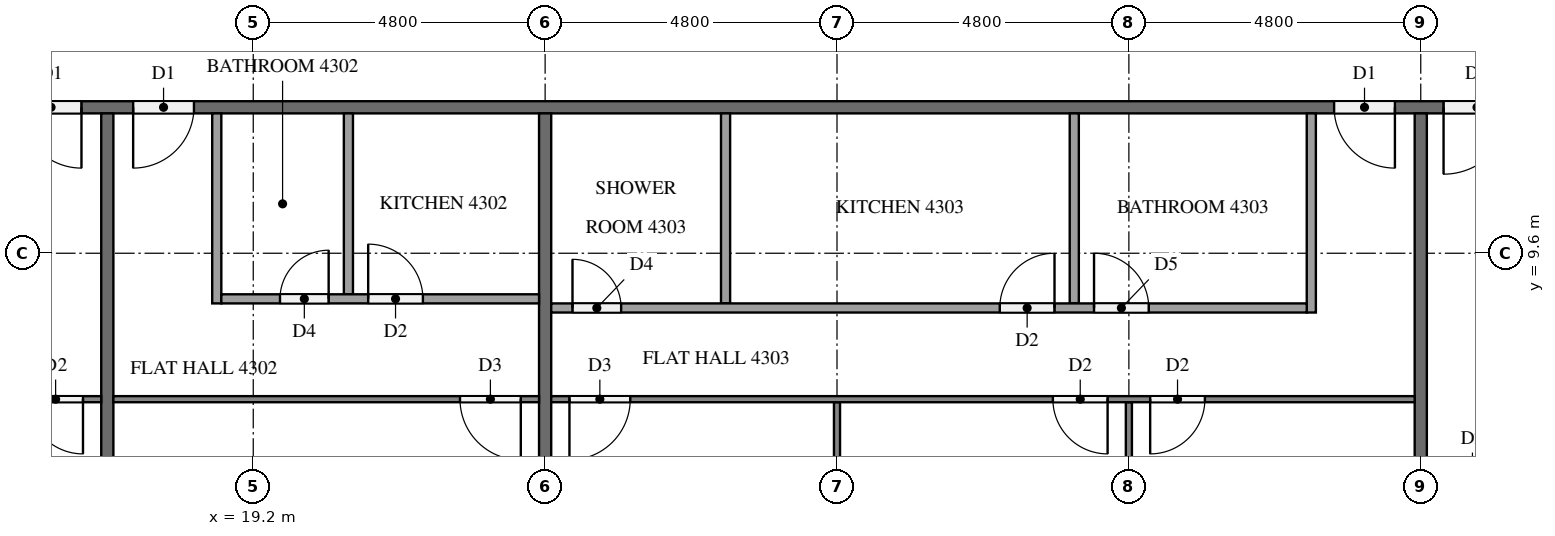
"""IFC4 building model, lengths in metres.
Left out: names, types, materials, properties, quantities, classifications, styles, units other than length and angle.
Written with IfcOpenShell. Run it as: python <this file> out.ifc"""

import sys

from ifc_helpers import new_model, si_unit, direction, frame, frame_2d, origin, place, context, subcontext, project, spatial, rectangle, extrude, element, fill, save


model = new_model("IFC4")
c1 = context("Model", 3, precision=1e-05, world=origin(), true_north=direction((0.0, 1.0)))
c2 = subcontext(c1, "Body", "Model", "MODEL_VIEW")
j1 = project(units=[si_unit("LENGTHUNIT", "METRE"), si_unit("PLANEANGLEUNIT", "RADIAN")], contexts=[c1])
p1 = place(None, origin())
s1 = spatial("IfcSite", under=j1, at=p1, CompositionType="ELEMENT")
p2 = place(p1, origin())
s2 = spatial("IfcBuilding", under=s1, at=p2, CompositionType="ELEMENT")
p3 = place(p2, frame((0.0, 0.0, 166.5)))
s3 = spatial("IfcBuildingStorey", under=s2, at=p3, CompositionType="ELEMENT", Elevation=166.5)
p4 = place(p3, frame((50.5, 12.0, 0.0), z_axis=(0.0, 0.0, 1.0), x_axis=(-1.0, 0.0, 0.0)))
e1 = element("IfcWall", 1, at=p4, inside=s3, PredefinedType="PARTITIONING", context=c2, shape_type="SweptSolid", body=[
    extrude(rectangle(XDim=38.6, YDim=0.2, at=frame_2d((19.3, 0.0))), origin(), (0.0, 0.0, 1.0), 3.2),
])
p5 = place(p4, frame((34.125, 0.0, 0.0)))
e2 = element("IfcOpeningElement", 2, at=p5, cuts=e1, PredefinedType="OPENING", context=c2, shape_type="SweptSolid", body=[
    extrude(rectangle(XDim=1.0, YDim=2.1, at=frame_2d((0.5, 1.05))), frame((0.0, 0.11, 0.0), z_axis=(0.0, -1.0, 0.0), x_axis=(1.0, 0.0, 0.0)), (0.0, 0.0, 1.0), 0.22),
])
p6 = place(p4, frame((32.275, 0.0, 0.0)))
e3 = element("IfcOpeningElement", 3, at=p6, cuts=e1, PredefinedType="OPENING", context=c2, shape_type="SweptSolid", body=[
    extrude(rectangle(XDim=1.0, YDim=2.1, at=frame_2d((0.5, 1.05))), frame((0.0, 0.11, 0.0), z_axis=(0.0, -1.0, 0.0), x_axis=(1.0, 0.0, 0.0)), (0.0, 0.0, 1.0), 0.22),
])
p7 = place(p4, frame((12.525, 0.0, 0.0)))
e4 = element("IfcOpeningElement", 4, at=p7, cuts=e1, PredefinedType="OPENING", context=c2, shape_type="SweptSolid", body=[
    extrude(rectangle(XDim=1.0, YDim=2.1, at=frame_2d((0.5, 1.05))), frame((0.0, 0.11, 0.0), z_axis=(0.0, -1.0, 0.0), x_axis=(1.0, 0.0, 0.0)), (0.0, 0.0, 1.0), 0.22),
])
p8 = place(p4, frame((10.625, 0.0, 0.0)))
e5 = element("IfcOpeningElement", 5, at=p8, cuts=e1, PredefinedType="OPENING", context=c2, shape_type="SweptSolid", body=[
    extrude(rectangle(XDim=1.1, YDim=2.1, at=frame_2d((0.55, 1.05))), frame((0.0, 0.11, 0.0), z_axis=(0.0, -1.0, 0.0), x_axis=(1.0, 0.0, 0.0)), (0.0, 0.0, 1.0), 0.22),
])
p9 = place(p3, frame((16.8, 11.9, 0.0), z_axis=(0.0, 0.0, 1.0), x_axis=(0.0, -1.0, 0.0)))
e6 = element("IfcWall", 6, at=p9, inside=s3, PredefinedType="PARTITIONING", context=c2, shape_type="SweptSolid", body=[
    extrude(rectangle(XDim=11.8, YDim=0.2, at=frame_2d((5.9, 0.0))), origin(), (0.0, 0.0, 1.0), 3.2),
])
p10 = place(p3, frame((24.0, 11.9, 0.0), z_axis=(0.0, 0.0, 1.0), x_axis=(0.0, -1.0, 0.0)))
e7 = element("IfcWall", 7, at=p10, inside=s3, PredefinedType="PARTITIONING", context=c2, shape_type="SweptSolid", body=[
    extrude(rectangle(XDim=11.525, YDim=0.2, at=frame_2d((5.762, 0.0))), origin(), (0.0, 0.0, 1.0), 3.2),
])
p11 = place(p3, frame((38.4, 11.9, 0.0), z_axis=(0.0, 0.0, 1.0), x_axis=(0.0, -1.0, 0.0)))
e8 = element("IfcWall", 8, at=p11, inside=s3, PredefinedType="PARTITIONING", context=c2, shape_type="SweptSolid", body=[
    extrude(rectangle(XDim=11.8, YDim=0.2, at=frame_2d((5.9, 0.0))), origin(), (0.0, 0.0, 1.0), 3.2),
])
p12 = place(p3, frame((16.7, 7.2, 0.0), z_axis=(0.0, 0.0, 1.0), x_axis=(-1.0, 0.0, 0.0)))
e9 = element("IfcWall", 9, at=p12, inside=s3, PredefinedType="PARTITIONING", context=c2, shape_type="SweptSolid", body=[
    extrude(rectangle(XDim=16.6, YDim=0.1, at=frame_2d((8.3, 0.0))), origin(), (0.0, 0.0, 1.0), 3.2),
])
p13 = place(p12, frame((0.3, 0.0, 0.0)))
e10 = element("IfcOpeningElement", 10, at=p13, cuts=e9, PredefinedType="OPENING", context=c2, shape_type="SweptSolid", body=[
    extrude(rectangle(XDim=0.9, YDim=2.1, at=frame_2d((0.45, 1.05))), frame((0.0, 0.06, 0.0), z_axis=(0.0, -1.0, 0.0), x_axis=(1.0, 0.0, 0.0)), (0.0, 0.0, 1.0), 0.12),
])
p14 = place(p12, frame((10.55, 0.0, 0.0)))
e11 = element("IfcOpeningElement", 11, at=p14, cuts=e9, PredefinedType="OPENING", context=c2, shape_type="SweptSolid", body=[
    extrude(rectangle(XDim=1.0, YDim=2.1, at=frame_2d((0.5, 1.05))), frame((0.0, 0.06, 0.0), z_axis=(0.0, -1.0, 0.0), x_axis=(1.0, 0.0, 0.0)), (0.0, 0.0, 1.0), 0.12),
])
p15 = place(p12, frame((12.25, 0.0, 0.0)))
e12 = element("IfcOpeningElement", 12, at=p15, cuts=e9, PredefinedType="OPENING", context=c2, shape_type="SweptSolid", body=[
    extrude(rectangle(XDim=0.9, YDim=2.1, at=frame_2d((0.45, 1.05))), frame((0.0, 0.06, 0.0), z_axis=(0.0, -1.0, 0.0), x_axis=(1.0, 0.0, 0.0)), (0.0, 0.0, 1.0), 0.12),
])
p16 = place(p3, frame((23.9, 7.2, 0.0), z_axis=(0.0, 0.0, 1.0), x_axis=(-1.0, 0.0, 0.0)))
e13 = element("IfcWall", 13, at=p16, inside=s3, PredefinedType="PARTITIONING", context=c2, shape_type="SweptSolid", body=[
    extrude(rectangle(XDim=7.0, YDim=0.1, at=frame_2d((3.5, 0.0))), origin(), (0.0, 0.0, 1.0), 3.2),
])
p17 = place(p16, frame((0.3, 0.0, 0.0)))
e14 = element("IfcOpeningElement", 14, at=p17, cuts=e13, PredefinedType="OPENING", context=c2, shape_type="SweptSolid", body=[
    extrude(rectangle(XDim=1.0, YDim=2.1, at=frame_2d((0.5, 1.05))), frame((0.0, 0.06, 0.0), z_axis=(0.0, -1.0, 0.0), x_axis=(1.0, 0.0, 0.0)), (0.0, 0.0, 1.0), 0.12),
])
p18 = place(p3, frame((20.765, 11.9, 0.0), z_axis=(0.0, 0.0, 1.0), x_axis=(0.0, -1.0, 0.0)))
e15 = element("IfcWall", 15, at=p18, inside=s3, PredefinedType="PARTITIONING", context=c2, shape_type="SweptSolid", body=[
    extrude(rectangle(XDim=2.975, YDim=0.15, at=frame_2d((1.487, 0.0))), origin(), (0.0, 0.0, 1.0), 3.2),
])
p19 = place(p3, frame((18.6, 11.9, 0.0), z_axis=(0.0, 0.0, 1.0), x_axis=(0.0, -1.0, 0.0)))
e16 = element("IfcWall", 16, at=p19, inside=s3, PredefinedType="PARTITIONING", context=c2, shape_type="SweptSolid", body=[
    extrude(rectangle(XDim=3.125, YDim=0.15, at=frame_2d((1.562, 0.0))), origin(), (0.0, 0.0, 1.0), 3.2),
])
p20 = place(p3, frame((18.675, 8.85, 0.0), z_axis=(0.0, 0.0, 1.0), x_axis=(1.0, 0.0, 0.0)))
e17 = element("IfcWall", 17, at=p20, inside=s3, PredefinedType="PARTITIONING", context=c2, shape_type="SweptSolid", body=[
    extrude(rectangle(XDim=5.225, YDim=0.15, at=frame_2d((2.612, 0.0))), origin(), (0.0, 0.0, 1.0), 3.2),
])
p21 = place(p20, frame((0.965, 0.0, 0.0)))
e18 = element("IfcOpeningElement", 18, at=p21, cuts=e17, PredefinedType="OPENING", context=c2, shape_type="SweptSolid", body=[
    extrude(rectangle(XDim=0.8, YDim=2.1, at=frame_2d((0.4, 1.05))), frame((0.0, 0.085, 0.0), z_axis=(0.0, -1.0, 0.0), x_axis=(1.0, 0.0, 0.0)), (0.0, 0.0, 1.0), 0.17),
])
p22 = place(p20, frame((2.415, 0.0, 0.0)))
e19 = element("IfcOpeningElement", 19, at=p22, cuts=e17, PredefinedType="OPENING", context=c2, shape_type="SweptSolid", body=[
    extrude(rectangle(XDim=0.9, YDim=2.1, at=frame_2d((0.45, 1.05))), frame((0.0, 0.085, 0.0), z_axis=(0.0, -1.0, 0.0), x_axis=(1.0, 0.0, 0.0)), (0.0, 0.0, 1.0), 0.17),
])
p23 = place(p3, frame((33.6, 7.15, 0.0), z_axis=(0.0, 0.0, 1.0), x_axis=(0.0, -1.0, 0.0)))
e20 = element("IfcWall", 20, at=p23, inside=s3, PredefinedType="PARTITIONING", context=c2, shape_type="SweptSolid", body=[
    extrude(rectangle(XDim=6.775, YDim=0.1, at=frame_2d((3.387, 0.0))), origin(), (0.0, 0.0, 1.0), 3.2),
])
p24 = place(p3, frame((28.8, 7.15, 0.0), z_axis=(0.0, 0.0, 1.0), x_axis=(0.0, -1.0, 0.0)))
e21 = element("IfcWall", 21, at=p24, inside=s3, PredefinedType="PARTITIONING", context=c2, shape_type="SweptSolid", body=[
    extrude(rectangle(XDim=7.05, YDim=0.1, at=frame_2d((3.525, 0.0))), origin(), (0.0, 0.0, 1.0), 3.2),
])
p25 = place(p3, frame((38.3, 7.2, 0.0), z_axis=(0.0, 0.0, 1.0), x_axis=(-1.0, 0.0, 0.0)))
e22 = element("IfcWall", 22, at=p25, inside=s3, PredefinedType="PARTITIONING", context=c2, shape_type="SweptSolid", body=[
    extrude(rectangle(XDim=14.2, YDim=0.1, at=frame_2d((7.1, 0.0))), origin(), (0.0, 0.0, 1.0), 3.2),
])
p26 = place(p25, frame((3.45, 0.0, 0.0)))
e23 = element("IfcOpeningElement", 23, at=p26, cuts=e22, PredefinedType="OPENING", context=c2, shape_type="SweptSolid", body=[
    extrude(rectangle(XDim=0.9, YDim=2.1, at=frame_2d((0.45, 1.05))), frame((0.0, 0.06, 0.0), z_axis=(0.0, -1.0, 0.0), x_axis=(1.0, 0.0, 0.0)), (0.0, 0.0, 1.0), 0.12),
])
p27 = place(p25, frame((5.05, 0.0, 0.0)))
e24 = element("IfcOpeningElement", 24, at=p27, cuts=e22, PredefinedType="OPENING", context=c2, shape_type="SweptSolid", body=[
    extrude(rectangle(XDim=0.9, YDim=2.1, at=frame_2d((0.45, 1.05))), frame((0.0, 0.06, 0.0), z_axis=(0.0, -1.0, 0.0), x_axis=(1.0, 0.0, 0.0)), (0.0, 0.0, 1.0), 0.12),
])
p28 = place(p25, frame((12.9, 0.0, 0.0)))
e25 = element("IfcOpeningElement", 25, at=p28, cuts=e22, PredefinedType="OPENING", context=c2, shape_type="SweptSolid", body=[
    extrude(rectangle(XDim=1.0, YDim=2.1, at=frame_2d((0.5, 1.05))), frame((0.0, 0.06, 0.0), z_axis=(0.0, -1.0, 0.0), x_axis=(1.0, 0.0, 0.0)), (0.0, 0.0, 1.0), 0.12),
])
for number, where, z_axis, x_axis in (
    (26, (32.702, 11.9, 0.0), (0.0, 0.0, 1.0), (0.0, -1.0, 0.0)),
    (27, (26.967, 11.9, 0.0), (0.0, 0.0, 1.0), (0.0, -1.0, 0.0)),
):
    element("IfcWall", number, at=place(p3, frame(where, z_axis=z_axis, x_axis=x_axis)), inside=s3, PredefinedType="PARTITIONING", context=c2, shape_type="SweptSolid", body=[
        extrude(rectangle(XDim=3.125, YDim=0.15, at=frame_2d((1.562, 0.0))), origin(), (0.0, 0.0, 1.0), 3.2),
    ])
p29 = place(p3, frame((36.6, 11.9, 0.0), z_axis=(0.0, 0.0, 1.0), x_axis=(0.0, -1.0, 0.0)))
e28 = element("IfcWall", 28, at=p29, inside=s3, PredefinedType="PARTITIONING", context=c2, shape_type="SweptSolid", body=[
    extrude(rectangle(XDim=3.275, YDim=0.15, at=frame_2d((1.637, 0.0))), origin(), (0.0, 0.0, 1.0), 3.2),
])
p30 = place(p3, frame((24.1, 8.7, 0.0), z_axis=(0.0, 0.0, 1.0), x_axis=(1.0, 0.0, 0.0)))
e29 = element("IfcWall", 29, at=p30, inside=s3, PredefinedType="PARTITIONING", context=c2, shape_type="SweptSolid", body=[
    extrude(rectangle(XDim=12.425, YDim=0.15, at=frame_2d((6.212, 0.0))), origin(), (0.0, 0.0, 1.0), 3.2),
])
p31 = place(p30, frame((8.927, 0.0, 0.0)))
e30 = element("IfcOpeningElement", 30, at=p31, cuts=e29, PredefinedType="OPENING", context=c2, shape_type="SweptSolid", body=[
    extrude(rectangle(XDim=0.9, YDim=2.1, at=frame_2d((0.45, 1.05))), frame((0.0, 0.085, 0.0), z_axis=(0.0, -1.0, 0.0), x_axis=(1.0, 0.0, 0.0)), (0.0, 0.0, 1.0), 0.17),
])
p32 = place(p30, frame((7.377, 0.0, 0.0)))
e31 = element("IfcOpeningElement", 31, at=p32, cuts=e29, PredefinedType="OPENING", context=c2, shape_type="SweptSolid", body=[
    extrude(rectangle(XDim=0.9, YDim=2.1, at=frame_2d((0.45, 1.05))), frame((0.0, 0.085, 0.0), z_axis=(0.0, -1.0, 0.0), x_axis=(1.0, 0.0, 0.0)), (0.0, 0.0, 1.0), 0.17),
])
p33 = place(p30, frame((0.35, 0.0, 0.0)))
e32 = element("IfcOpeningElement", 32, at=p33, cuts=e29, PredefinedType="OPENING", context=c2, shape_type="SweptSolid", body=[
    extrude(rectangle(XDim=0.8, YDim=2.1, at=frame_2d((0.4, 1.05))), frame((0.0, 0.085, 0.0), z_axis=(0.0, -1.0, 0.0), x_axis=(1.0, 0.0, 0.0)), (0.0, 0.0, 1.0), 0.17),
])
p34 = place(p5, origin())
e33 = element("IfcDoor", 33, at=p34, inside=s3, OperationType="SINGLE_SWING_LEFT", PredefinedType="DOOR", context=c2, shape_type="SweptSolid", body=[
    extrude(rectangle(XDim=1.0, YDim=2.1, at=frame_2d((0.5, 1.05))), frame((0.0, 0.025, 0.0), z_axis=(0.0, -1.0, 0.0), x_axis=(1.0, 0.0, 0.0)), (0.0, 0.0, 1.0), 0.05),
])
fill(e2, e33)
p35 = place(p6, origin())
e34 = element("IfcDoor", 34, at=p35, inside=s3, OperationType="SINGLE_SWING_RIGHT", PredefinedType="DOOR", context=c2, shape_type="SweptSolid", body=[
    extrude(rectangle(XDim=1.0, YDim=2.1, at=frame_2d((0.5, 1.05))), frame((0.0, 0.025, 0.0), z_axis=(0.0, -1.0, 0.0), x_axis=(1.0, 0.0, 0.0)), (0.0, 0.0, 1.0), 0.05),
])
fill(e3, e34)
p36 = place(p7, origin())
e35 = element("IfcDoor", 35, at=p36, inside=s3, OperationType="SINGLE_SWING_LEFT", PredefinedType="DOOR", context=c2, shape_type="SweptSolid", body=[
    extrude(rectangle(XDim=1.0, YDim=2.1, at=frame_2d((0.5, 1.05))), frame((0.0, 0.025, 0.0), z_axis=(0.0, -1.0, 0.0), x_axis=(1.0, 0.0, 0.0)), (0.0, 0.0, 1.0), 0.05),
])
fill(e4, e35)
p37 = place(p8, origin())
e36 = element("IfcDoor", 36, at=p37, inside=s3, OperationType="SINGLE_SWING_RIGHT", PredefinedType="DOOR", context=c2, shape_type="SweptSolid", body=[
    extrude(rectangle(XDim=1.1, YDim=2.1, at=frame_2d((0.55, 1.05))), frame((0.0, 0.025, 0.0), z_axis=(0.0, -1.0, 0.0), x_axis=(1.0, 0.0, 0.0)), (0.0, 0.0, 1.0), 0.05),
])
fill(e5, e36)
p38 = place(p13, origin())
e37 = element("IfcDoor", 37, at=p38, inside=s3, OperationType="SINGLE_SWING_LEFT", PredefinedType="DOOR", context=c2, shape_type="SweptSolid", body=[
    extrude(rectangle(XDim=0.9, YDim=2.1, at=frame_2d((0.45, 1.05))), frame((0.0, 0.025, 0.0), z_axis=(0.0, -1.0, 0.0), x_axis=(1.0, 0.0, 0.0)), (0.0, 0.0, 1.0), 0.05),
])
fill(e10, e37)
p39 = place(p17, origin())
e38 = element("IfcDoor", 38, at=p39, inside=s3, OperationType="SINGLE_SWING_LEFT", PredefinedType="DOOR", context=c2, shape_type="SweptSolid", body=[
    extrude(rectangle(XDim=1.0, YDim=2.1, at=frame_2d((0.5, 1.05))), frame((0.0, 0.025, 0.0), z_axis=(0.0, -1.0, 0.0), x_axis=(1.0, 0.0, 0.0)), (0.0, 0.0, 1.0), 0.05),
])
fill(e14, e38)
p40 = place(p21, origin())
e39 = element("IfcDoor", 39, at=p40, inside=s3, OperationType="SINGLE_SWING_RIGHT", PredefinedType="DOOR", context=c2, shape_type="SweptSolid", body=[
    extrude(rectangle(XDim=0.8, YDim=2.1, at=frame_2d((0.4, 1.05))), frame((0.0, 0.025, 0.0), z_axis=(0.0, -1.0, 0.0), x_axis=(1.0, 0.0, 0.0)), (0.0, 0.0, 1.0), 0.05),
])
fill(e18, e39)
p41 = place(p22, origin())
e40 = element("IfcDoor", 40, at=p41, inside=s3, OperationType="SINGLE_SWING_LEFT", PredefinedType="DOOR", context=c2, shape_type="SweptSolid", body=[
    extrude(rectangle(XDim=0.9, YDim=2.1, at=frame_2d((0.45, 1.05))), frame((0.0, 0.025, 0.0), z_axis=(0.0, -1.0, 0.0), x_axis=(1.0, 0.0, 0.0)), (0.0, 0.0, 1.0), 0.05),
])
fill(e19, e40)
p42 = place(p26, origin())
e41 = element("IfcDoor", 41, at=p42, inside=s3, OperationType="SINGLE_SWING_RIGHT", PredefinedType="DOOR", context=c2, shape_type="SweptSolid", body=[
    extrude(rectangle(XDim=0.9, YDim=2.1, at=frame_2d((0.45, 1.05))), frame((0.0, 0.025, 0.0), z_axis=(0.0, -1.0, 0.0), x_axis=(1.0, 0.0, 0.0)), (0.0, 0.0, 1.0), 0.05),
])
fill(e23, e41)
p43 = place(p27, origin())
e42 = element("IfcDoor", 42, at=p43, inside=s3, OperationType="SINGLE_SWING_LEFT", PredefinedType="DOOR", context=c2, shape_type="SweptSolid", body=[
    extrude(rectangle(XDim=0.9, YDim=2.1, at=frame_2d((0.45, 1.05))), frame((0.0, 0.025, 0.0), z_axis=(0.0, -1.0, 0.0), x_axis=(1.0, 0.0, 0.0)), (0.0, 0.0, 1.0), 0.05),
])
fill(e24, e42)
p44 = place(p28, origin())
e43 = element("IfcDoor", 43, at=p44, inside=s3, OperationType="SINGLE_SWING_RIGHT", PredefinedType="DOOR", context=c2, shape_type="SweptSolid", body=[
    extrude(rectangle(XDim=1.0, YDim=2.1, at=frame_2d((0.5, 1.05))), frame((0.0, 0.025, 0.0), z_axis=(0.0, -1.0, 0.0), x_axis=(1.0, 0.0, 0.0)), (0.0, 0.0, 1.0), 0.05),
])
fill(e25, e43)
p45 = place(p31, origin())
e44 = element("IfcDoor", 44, at=p45, inside=s3, OperationType="SINGLE_SWING_LEFT", PredefinedType="DOOR", context=c2, shape_type="SweptSolid", body=[
    extrude(rectangle(XDim=0.9, YDim=2.1, at=frame_2d((0.45, 1.05))), frame((0.0, 0.025, 0.0), z_axis=(0.0, -1.0, 0.0), x_axis=(1.0, 0.0, 0.0)), (0.0, 0.0, 1.0), 0.05),
])
fill(e30, e44)
p46 = place(p32, origin())
e45 = element("IfcDoor", 45, at=p46, inside=s3, OperationType="SINGLE_SWING_RIGHT", PredefinedType="DOOR", context=c2, shape_type="SweptSolid", body=[
    extrude(rectangle(XDim=0.9, YDim=2.1, at=frame_2d((0.45, 1.05))), frame((0.0, 0.025, 0.0), z_axis=(0.0, -1.0, 0.0), x_axis=(1.0, 0.0, 0.0)), (0.0, 0.0, 1.0), 0.05),
])
fill(e31, e45)
p47 = place(p33, origin())
e46 = element("IfcDoor", 46, at=p47, inside=s3, OperationType="SINGLE_SWING_LEFT", PredefinedType="DOOR", context=c2, shape_type="SweptSolid", body=[
    extrude(rectangle(XDim=0.8, YDim=2.1, at=frame_2d((0.4, 1.05))), frame((0.0, 0.025, 0.0), z_axis=(0.0, -1.0, 0.0), x_axis=(1.0, 0.0, 0.0)), (0.0, 0.0, 1.0), 0.05),
])
fill(e32, e46)
save(model, sys.argv[1])
